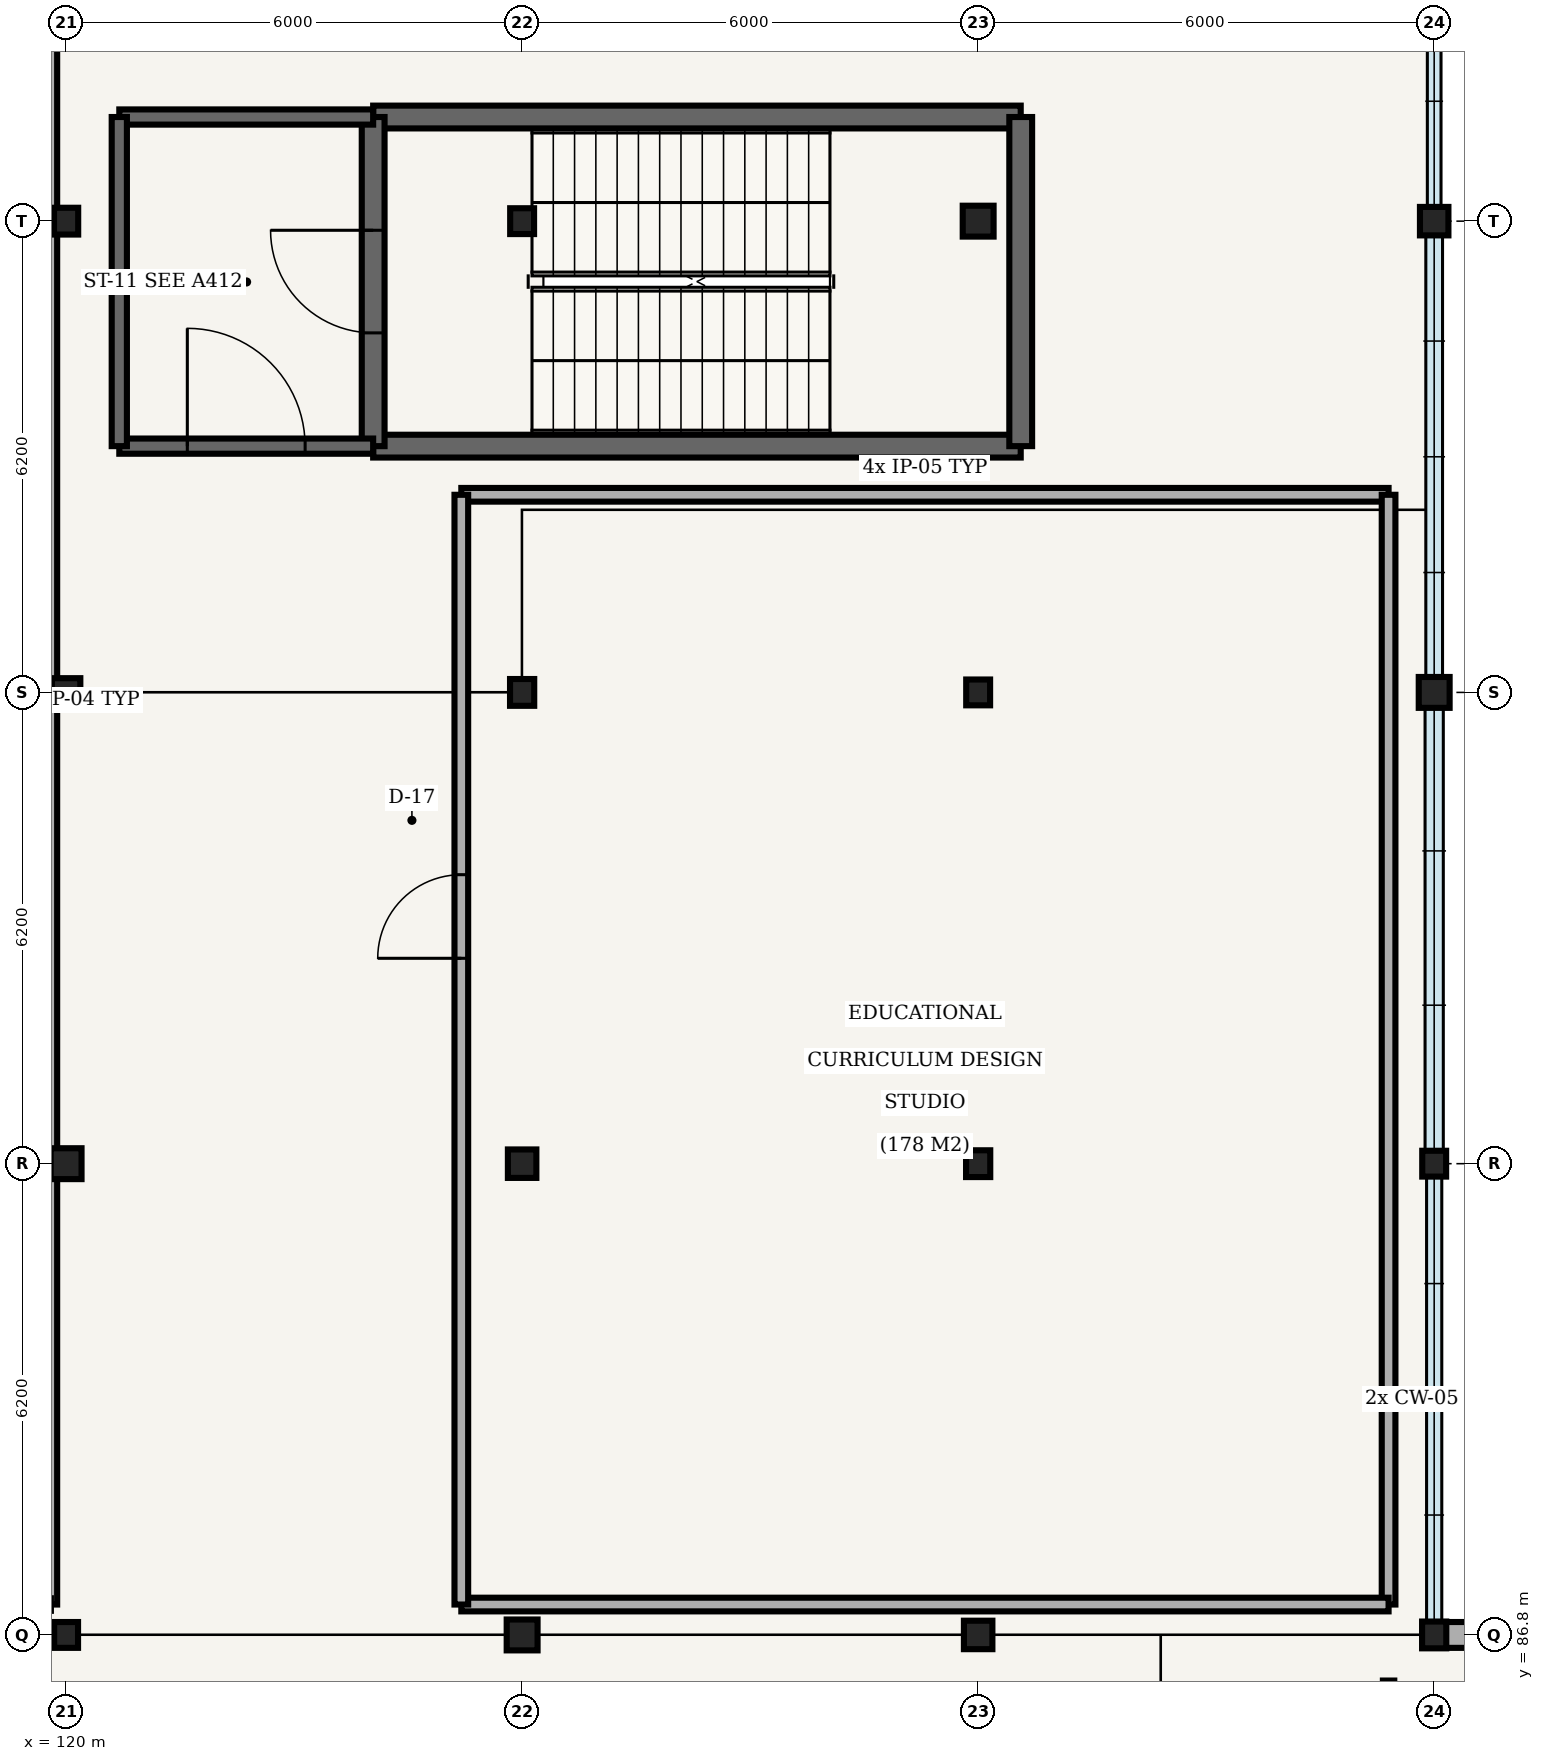
"""IFC4 building model, lengths in metres.
Left out: names, types, materials, properties, quantities, classifications, styles, units other than length and angle.
Written with IfcOpenShell. Run it as: python <this file> out.ifc"""

import sys

from ifc_helpers import new_model, si_unit, direction, frame, frame_2d, origin, origin_2d, place, context, subcontext, project, spatial, rectangle, hollow_circle, i_section, extrude, element, fill, save


model = new_model("IFC4")
c1 = context("Model", 3, precision=1e-05, world=origin(), true_north=direction((0.0, 1.0)))
c2 = subcontext(c1, "Body", "Model", "MODEL_VIEW")
j1 = project(units=[si_unit("LENGTHUNIT", "METRE"), si_unit("PLANEANGLEUNIT", "RADIAN")], contexts=[c1])
p1 = place(None, origin())
s1 = spatial("IfcSite", under=j1, at=p1, CompositionType="ELEMENT")
p2 = place(p1, origin())
s2 = spatial("IfcBuilding", under=s1, at=p2, CompositionType="ELEMENT")
p3 = place(p2, frame((0.0, 0.0, 5.4)))
s3 = spatial("IfcBuildingStorey", under=s2, at=p3, CompositionType="ELEMENT", Elevation=5.4)
p4 = place(p3, frame((120.0, 86.8, 0.0), z_axis=(0.0, 0.0, 1.0), x_axis=(1.0, 0.0, 0.0)))
e1 = element("IfcColumn", 1, at=p4, inside=s3, PredefinedType="COLUMN", context=c2, shape_type="SweptSolid", body=[
    extrude(i_section(OverallWidth=0.314, OverallDepth=0.34, WebThickness=0.019, FlangeThickness=0.031, FilletRadius=0.015, at=origin_2d()), origin(), (0.0, 0.0, 1.0), 5.4),
])
p5 = place(p3, frame((120.0, 93.0, 0.0), z_axis=(0.0, 0.0, 1.0), x_axis=(1.0, 0.0, 0.0)))
e2 = element("IfcColumn", 2, at=p5, inside=s3, PredefinedType="COLUMN", context=c2, shape_type="SweptSolid", body=[
    extrude(hollow_circle(Radius=0.203, WallThickness=0.016, at=origin_2d()), origin(), (0.0, 0.0, 1.0), 5.4),
])
p6 = place(p3, frame((120.0, 99.2, 0.0), z_axis=(0.0, 0.0, 1.0), x_axis=(1.0, 0.0, 0.0)))
e3 = element("IfcColumn", 3, at=p6, inside=s3, PredefinedType="COLUMN", context=c2, shape_type="SweptSolid", body=[
    extrude(i_section(OverallWidth=0.375, OverallDepth=0.375, WebThickness=0.017, FlangeThickness=0.027, FilletRadius=0.015, at=origin_2d()), origin(), (0.0, 0.0, 1.0), 5.4),
])
p7 = place(p3, frame((120.0, 105.4, 0.0), z_axis=(0.0, 0.0, 1.0), x_axis=(1.0, 0.0, 0.0)))
e4 = element("IfcColumn", 4, at=p7, inside=s3, PredefinedType="COLUMN", context=c2, shape_type="SweptSolid", body=[
    extrude(i_section(OverallWidth=0.318, OverallDepth=0.353, WebThickness=0.023, FlangeThickness=0.038, FilletRadius=0.015, at=origin_2d()), origin(), (0.0, 0.0, 1.0), 5.4),
])
p8 = place(p3, frame((126.0, 86.8, 0.0), z_axis=(0.0, 0.0, 1.0), x_axis=(1.0, 0.0, 0.0)))
e5 = element("IfcColumn", 5, at=p8, inside=s3, PredefinedType="COLUMN", context=c2, shape_type="SweptSolid", body=[
    extrude(hollow_circle(Radius=0.203, WallThickness=0.016, at=origin_2d()), origin(), (0.0, 0.0, 1.0), 5.4),
])
p9 = place(p3, frame((126.0, 93.0, 0.0), z_axis=(0.0, 0.0, 1.0), x_axis=(1.0, 0.0, 0.0)))
e6 = element("IfcColumn", 6, at=p9, inside=s3, PredefinedType="COLUMN", context=c2, shape_type="SweptSolid", body=[
    extrude(i_section(OverallWidth=0.375, OverallDepth=0.375, WebThickness=0.017, FlangeThickness=0.027, FilletRadius=0.015, at=origin_2d()), origin(), (0.0, 0.0, 1.0), 5.4),
])
p10 = place(p3, frame((126.0, 99.2, 0.0), z_axis=(0.0, 0.0, 1.0), x_axis=(1.0, 0.0, 0.0)))
e7 = element("IfcColumn", 7, at=p10, inside=s3, PredefinedType="COLUMN", context=c2, shape_type="SweptSolid", body=[
    extrude(i_section(OverallWidth=0.318, OverallDepth=0.353, WebThickness=0.023, FlangeThickness=0.038, FilletRadius=0.015, at=origin_2d()), origin(), (0.0, 0.0, 1.0), 5.4),
])
p11 = place(p3, frame((126.0, 105.4, 0.0), z_axis=(0.0, 0.0, 1.0), x_axis=(1.0, 0.0, 0.0)))
e8 = element("IfcColumn", 8, at=p11, inside=s3, PredefinedType="COLUMN", context=c2, shape_type="SweptSolid", body=[
    extrude(i_section(OverallWidth=0.314, OverallDepth=0.34, WebThickness=0.019, FlangeThickness=0.031, FilletRadius=0.015, at=origin_2d()), origin(), (0.0, 0.0, 1.0), 5.4),
])
p12 = place(p3, frame((132.0, 86.8, 0.0), z_axis=(0.0, 0.0, 1.0), x_axis=(1.0, 0.0, 0.0)))
e9 = element("IfcColumn", 9, at=p12, inside=s3, PredefinedType="COLUMN", context=c2, shape_type="SweptSolid", body=[
    extrude(i_section(OverallWidth=0.375, OverallDepth=0.375, WebThickness=0.017, FlangeThickness=0.027, FilletRadius=0.015, at=origin_2d()), origin(), (0.0, 0.0, 1.0), 5.4),
])
p13 = place(p3, frame((132.0, 93.0, 0.0), z_axis=(0.0, 0.0, 1.0), x_axis=(1.0, 0.0, 0.0)))
e10 = element("IfcColumn", 10, at=p13, inside=s3, PredefinedType="COLUMN", context=c2, shape_type="SweptSolid", body=[
    extrude(i_section(OverallWidth=0.318, OverallDepth=0.353, WebThickness=0.023, FlangeThickness=0.038, FilletRadius=0.015, at=origin_2d()), origin(), (0.0, 0.0, 1.0), 5.4),
])
p14 = place(p3, frame((132.0, 99.2, 0.0), z_axis=(0.0, 0.0, 1.0), x_axis=(1.0, 0.0, 0.0)))
e11 = element("IfcColumn", 11, at=p14, inside=s3, PredefinedType="COLUMN", context=c2, shape_type="SweptSolid", body=[
    extrude(i_section(OverallWidth=0.314, OverallDepth=0.34, WebThickness=0.019, FlangeThickness=0.031, FilletRadius=0.015, at=origin_2d()), origin(), (0.0, 0.0, 1.0), 5.4),
])
p15 = place(p3, frame((132.0, 105.4, 0.0), z_axis=(0.0, 0.0, 1.0), x_axis=(1.0, 0.0, 0.0)))
e12 = element("IfcColumn", 12, at=p15, inside=s3, PredefinedType="COLUMN", context=c2, shape_type="SweptSolid", body=[
    extrude(hollow_circle(Radius=0.203, WallThickness=0.016, at=origin_2d()), origin(), (0.0, 0.0, 1.0), 5.4),
])
p16 = place(p3, frame((138.0, 86.8, 0.0), z_axis=(0.0, 0.0, 1.0), x_axis=(1.0, 0.0, 0.0)))
e13 = element("IfcColumn", 13, at=p16, inside=s3, PredefinedType="COLUMN", context=c2, shape_type="SweptSolid", body=[
    extrude(i_section(OverallWidth=0.318, OverallDepth=0.353, WebThickness=0.023, FlangeThickness=0.038, FilletRadius=0.015, at=origin_2d()), origin(), (0.0, 0.0, 1.0), 5.4),
])
p17 = place(p3, frame((138.0, 93.0, 0.0), z_axis=(0.0, 0.0, 1.0), x_axis=(1.0, 0.0, 0.0)))
e14 = element("IfcColumn", 14, at=p17, inside=s3, PredefinedType="COLUMN", context=c2, shape_type="SweptSolid", body=[
    extrude(i_section(OverallWidth=0.314, OverallDepth=0.34, WebThickness=0.019, FlangeThickness=0.031, FilletRadius=0.015, at=origin_2d()), origin(), (0.0, 0.0, 1.0), 5.4),
])
p18 = place(p3, frame((138.0, 99.2, 0.0), z_axis=(0.0, 0.0, 1.0), x_axis=(1.0, 0.0, 0.0)))
e15 = element("IfcColumn", 15, at=p18, inside=s3, PredefinedType="COLUMN", context=c2, shape_type="SweptSolid", body=[
    extrude(hollow_circle(Radius=0.203, WallThickness=0.016, at=origin_2d()), origin(), (0.0, 0.0, 1.0), 5.4),
])
p19 = place(p3, frame((138.0, 105.4, 0.0), z_axis=(0.0, 0.0, 1.0), x_axis=(1.0, 0.0, 0.0)))
e16 = element("IfcColumn", 16, at=p19, inside=s3, PredefinedType="COLUMN", context=c2, shape_type="SweptSolid", body=[
    extrude(i_section(OverallWidth=0.375, OverallDepth=0.375, WebThickness=0.017, FlangeThickness=0.027, FilletRadius=0.015, at=origin_2d()), origin(), (0.0, 0.0, 1.0), 5.4),
])
p20 = place(p3, frame((144.075, 86.8, 0.0), z_axis=(0.0, 0.0, 1.0), x_axis=(-1.0, 0.0, 0.0)))
e17 = element("IfcWall", 17, at=p20, inside=s3, PredefinedType="SOLIDWALL", context=c2, shape_type="SweptSolid", body=[
    extrude(rectangle(XDim=6.15, YDim=0.34, at=frame_2d((3.075, 0.0))), origin(), (0.0, 0.0, 1.0), 4.44),
])
p21 = place(p20, frame((2.45, 0.0, 0.9)))
e18 = element("IfcOpeningElement", 18, at=p21, cuts=e17, PredefinedType="OPENING", context=c2, shape_type="SweptSolid", body=[
    extrude(rectangle(XDim=1.25, YDim=1.7, at=frame_2d((0.625, 0.85))), frame((0.0, 0.18, 0.0), z_axis=(0.0, -1.0, 0.0), x_axis=(1.0, 0.0, 0.0)), (0.0, 0.0, 1.0), 0.36),
])
for number, where, z_axis, x_axis in (
    (19, (124.04, 102.44, 0.0), (0.0, 0.0, 1.0), (1.0, 0.0, 0.0)),
    (20, (132.56, 106.77, 0.0), (0.0, 0.0, 1.0), (-1.0, 0.0, 0.0)),
):
    element("IfcWall", number, at=place(p3, frame(where, z_axis=z_axis, x_axis=x_axis)), inside=s3, PredefinedType="SHEAR", context=c2, shape_type="SweptSolid", body=[
        extrude(rectangle(XDim=8.52, YDim=0.3, at=frame_2d((4.26, 0.0))), origin(), (0.0, 0.0, 1.0), 5.15),
    ])
p22 = place(p3, frame((124.04, 106.77, 0.0), z_axis=(0.0, 0.0, 1.0), x_axis=(0.0, -1.0, 0.0)))
e21 = element("IfcWall", 21, at=p22, inside=s3, PredefinedType="SHEAR", context=c2, shape_type="SweptSolid", body=[
    extrude(rectangle(XDim=4.33, YDim=0.3, at=frame_2d((2.165, 0.0))), origin(), (0.0, 0.0, 1.0), 5.15),
])
p23 = place(p22, frame((1.49, 0.0, 0.0)))
e22 = element("IfcOpeningElement", 22, at=p23, cuts=e21, PredefinedType="OPENING", context=c2, shape_type="SweptSolid", body=[
    extrude(rectangle(XDim=1.35, YDim=2.2, at=frame_2d((0.675, 1.1))), frame((0.0, 0.16, 0.0), z_axis=(0.0, -1.0, 0.0), x_axis=(1.0, 0.0, 0.0)), (0.0, 0.0, 1.0), 0.32),
])
p24 = place(p3, frame((132.56, 102.44, 0.0), z_axis=(0.0, 0.0, 1.0), x_axis=(0.0, 1.0, 0.0)))
e23 = element("IfcWall", 23, at=p24, inside=s3, PredefinedType="SHEAR", context=c2, shape_type="SweptSolid", body=[
    extrude(rectangle(XDim=4.33, YDim=0.3, at=frame_2d((2.165, 0.0))), origin(), (0.0, 0.0, 1.0), 5.15),
])
p25 = place(p3, frame((120.7, 102.44, 0.0), z_axis=(0.0, 0.0, 1.0), x_axis=(1.0, 0.0, 0.0)))
e24 = element("IfcWall", 24, at=p25, inside=s3, PredefinedType="SHEAR", context=c2, shape_type="SweptSolid", body=[
    extrude(rectangle(XDim=3.34, YDim=0.2, at=frame_2d((1.67, 0.0))), origin(), (0.0, 0.0, 1.0), 5.15),
])
p26 = place(p25, frame((0.895, 0.0, 0.0)))
e25 = element("IfcOpeningElement", 25, at=p26, cuts=e24, PredefinedType="OPENING", context=c2, shape_type="SweptSolid", body=[
    extrude(rectangle(XDim=1.55, YDim=2.2, at=frame_2d((0.775, 1.1))), frame((0.0, 0.11, 0.0), z_axis=(0.0, -1.0, 0.0), x_axis=(1.0, 0.0, 0.0)), (0.0, 0.0, 1.0), 0.22),
])
p27 = place(p3, frame((124.04, 106.77, 0.0), z_axis=(0.0, 0.0, 1.0), x_axis=(-1.0, 0.0, 0.0)))
e26 = element("IfcWall", 26, at=p27, inside=s3, PredefinedType="SHEAR", context=c2, shape_type="SweptSolid", body=[
    extrude(rectangle(XDim=3.34, YDim=0.2, at=frame_2d((1.67, 0.0))), origin(), (0.0, 0.0, 1.0), 5.15),
])
p28 = place(p3, frame((120.7, 106.77, 0.0), z_axis=(0.0, 0.0, 1.0), x_axis=(0.0, -1.0, 0.0)))
e27 = element("IfcWall", 27, at=p28, inside=s3, PredefinedType="SHEAR", context=c2, shape_type="SweptSolid", body=[
    extrude(rectangle(XDim=4.33, YDim=0.2, at=frame_2d((2.165, 0.0))), origin(), (0.0, 0.0, 1.0), 5.15),
])
p29 = place(p3, frame((119.8, 111.0, 0.0), z_axis=(0.0, 0.0, 1.0), x_axis=(0.0, -1.0, 0.0)))
e28 = element("IfcWall", 28, at=p29, inside=s3, PredefinedType="PARTITIONING", context=c2, shape_type="SweptSolid", body=[
    extrude(rectangle(XDim=23.8, YDim=0.165, at=frame_2d((11.9, 0.0))), origin(), (0.0, 0.0, 1.0), 4.35),
])
p30 = place(p3, frame((125.2, 101.8, 0.0), z_axis=(0.0, 0.0, 1.0), x_axis=(1.0, 0.0, 0.0)))
e29 = element("IfcWall", 29, at=p30, inside=s3, PredefinedType="PARTITIONING", context=c2, shape_type="SweptSolid", body=[
    extrude(rectangle(XDim=12.2, YDim=0.18, at=frame_2d((6.1, 0.0))), origin(), (0.0, 0.0, 1.0), 4.35),
])
p31 = place(p3, frame((137.4, 101.8, 0.0), z_axis=(0.0, 0.0, 1.0), x_axis=(0.0, -1.0, 0.0)))
e30 = element("IfcWall", 30, at=p31, inside=s3, PredefinedType="PARTITIONING", context=c2, shape_type="SweptSolid", body=[
    extrude(rectangle(XDim=14.6, YDim=0.18, at=frame_2d((7.3, 0.0))), origin(), (0.0, 0.0, 1.0), 4.35),
])
p32 = place(p3, frame((137.4, 87.2, 0.0), z_axis=(0.0, 0.0, 1.0), x_axis=(-1.0, 0.0, 0.0)))
e31 = element("IfcWall", 31, at=p32, inside=s3, PredefinedType="PARTITIONING", context=c2, shape_type="SweptSolid", body=[
    extrude(rectangle(XDim=12.2, YDim=0.18, at=frame_2d((6.1, 0.0))), origin(), (0.0, 0.0, 1.0), 4.35),
])
p33 = place(p3, frame((125.2, 87.2, 0.0), z_axis=(0.0, 0.0, 1.0), x_axis=(0.0, 1.0, 0.0)))
e32 = element("IfcWall", 32, at=p33, inside=s3, PredefinedType="PARTITIONING", context=c2, shape_type="SweptSolid", body=[
    extrude(rectangle(XDim=14.6, YDim=0.18, at=frame_2d((7.3, 0.0))), origin(), (0.0, 0.0, 1.0), 4.35),
])
p34 = place(p33, frame((8.502, 0.0, 0.0)))
e33 = element("IfcOpeningElement", 33, at=p34, cuts=e32, PredefinedType="OPENING", context=c2, shape_type="SweptSolid", body=[
    extrude(rectangle(XDim=1.1, YDim=2.25, at=frame_2d((0.55, 1.125))), frame((0.0, 0.1, 0.0), z_axis=(0.0, -1.0, 0.0), x_axis=(1.0, 0.0, 0.0)), (0.0, 0.0, 1.0), 0.2),
])
p35 = place(p23, origin())
e34 = element("IfcDoor", 34, at=p35, inside=s3, OperationType="SINGLE_SWING_RIGHT", PredefinedType="DOOR", context=c2, shape_type="SweptSolid", body=[
    extrude(rectangle(XDim=1.35, YDim=2.2, at=frame_2d((0.675, 1.1))), frame((0.0, 0.025, 0.0), z_axis=(0.0, -1.0, 0.0), x_axis=(1.0, 0.0, 0.0)), (0.0, 0.0, 1.0), 0.05),
])
fill(e22, e34)
p36 = place(p26, origin())
e35 = element("IfcDoor", 35, at=p36, inside=s3, OperationType="SINGLE_SWING_LEFT", PredefinedType="DOOR", context=c2, shape_type="SweptSolid", body=[
    extrude(rectangle(XDim=1.55, YDim=2.2, at=frame_2d((0.775, 1.1))), frame((0.0, 0.025, 0.0), z_axis=(0.0, -1.0, 0.0), x_axis=(1.0, 0.0, 0.0)), (0.0, 0.0, 1.0), 0.05),
])
fill(e25, e35)
p37 = place(p34, origin())
e36 = element("IfcDoor", 36, at=p37, inside=s3, OperationType="SINGLE_SWING_LEFT", PredefinedType="DOOR", context=c2, shape_type="SweptSolid", body=[
    extrude(rectangle(XDim=1.1, YDim=2.25, at=frame_2d((0.55, 1.125))), frame((0.0, 0.025, 0.0), z_axis=(0.0, -1.0, 0.0), x_axis=(1.0, 0.0, 0.0)), (0.0, 0.0, 1.0), 0.05),
])
fill(e33, e36)
save(model, sys.argv[1])
